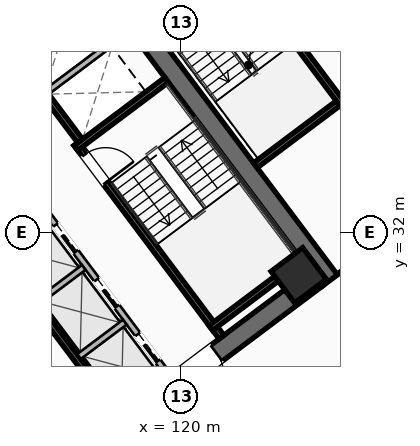
"""IFC4 building model, lengths in metres.
Left out: names, types, materials, properties, quantities, classifications, styles, units other than length and angle.
Written with IfcOpenShell. Run it as: python <this file> out.ifc"""

import sys

from ifc_helpers import new_model, si_unit, direction, frame, frame_2d, origin, origin_2d, place, context, subcontext, project, spatial, rectangle, hollow_rectangle, extrude, element, fill, save


model = new_model("IFC4")
c1 = context("Model", 3, precision=1e-05, world=origin(), true_north=direction((0.0, 1.0)))
c2 = subcontext(c1, "Body", "Model", "MODEL_VIEW")
j1 = project(units=[si_unit("LENGTHUNIT", "METRE"), si_unit("PLANEANGLEUNIT", "RADIAN")], contexts=[c1])
p1 = place(None, origin())
s1 = spatial("IfcSite", under=j1, at=p1, CompositionType="ELEMENT")
p2 = place(p1, origin())
s2 = spatial("IfcBuilding", under=s1, at=p2, CompositionType="ELEMENT")
p3 = place(p2, frame((0.0, 0.0, 42.35)))
s3 = spatial("IfcBuildingStorey", under=s2, at=p3, CompositionType="ELEMENT", Elevation=42.35)
p4 = place(p3, frame((115.524, 42.893, 0.0), z_axis=(0.0, 0.0, 1.0), x_axis=(0.600005007985, -0.799996243986, 0.0)))
e1 = element("IfcWall", 1, at=p4, inside=s3, PredefinedType="SHEAR", context=c2, shape_type="SweptSolid", body=[
    extrude(rectangle(XDim=15.6, YDim=0.65, at=frame_2d((7.8, 0.0))), origin(), (0.0, 0.0, 1.0), 3.55),
])
p5 = place(p3, frame((124.429, 30.478, 0.0), z_axis=(0.0, 0.0, 1.0), x_axis=(-0.799998028465, -0.600002628705, 0.0)))
e2 = element("IfcWall", 2, at=p5, inside=s3, PredefinedType="SHEAR", context=c2, shape_type="SweptSolid", body=[
    extrude(rectangle(XDim=14.86, YDim=0.65, at=frame_2d((7.43, 0.0))), origin(), (0.0, 0.0, 1.0), 3.55),
])
p6 = place(p5, frame((9.13, 0.0, 0.0)))
e3 = element("IfcOpeningElement", 3, at=p6, cuts=e2, PredefinedType="OPENING", context=c2, shape_type="SweptSolid", body=[
    extrude(rectangle(XDim=1.25, YDim=2.25, at=frame_2d((0.625, 1.125))), frame((0.0, 0.335, 0.0), z_axis=(0.0, -1.0, 0.0), x_axis=(1.0, 0.0, 0.0)), (0.0, 0.0, 1.0), 0.67),
])
p7 = place(p5, frame((4.08, 0.0, 0.0)))
e4 = element("IfcOpeningElement", 4, at=p7, cuts=e2, PredefinedType="OPENING", context=c2, shape_type="SweptSolid", body=[
    extrude(rectangle(XDim=1.25, YDim=2.25, at=frame_2d((0.625, 1.125))), frame((0.0, 0.335, 0.0), z_axis=(0.0, -1.0, 0.0), x_axis=(1.0, 0.0, 0.0)), (0.0, 0.0, 1.0), 0.67),
])
p8 = place(p3, frame((123.87, 30.59, 0.0), z_axis=(0.0, 0.0, 1.0), x_axis=(0.799999996291, 0.600000004945, 0.0)))
e5 = element("IfcColumn", 5, at=p8, inside=s3, PredefinedType="COLUMN", context=c2, shape_type="SweptSolid", body=[
    extrude(hollow_rectangle(XDim=1.3, YDim=1.3, WallThickness=0.05, at=origin_2d()), origin(), (0.0, 0.0, 1.0), 3.35),
])
p9 = place(p3, frame((116.56, 34.92, 0.0), z_axis=(0.0, 0.0, 1.0), x_axis=(0.600009827119, -0.799992629566, 0.0)))
e6 = element("IfcWall", 6, at=p9, inside=s3, PredefinedType="SHEAR", context=c2, shape_type="SweptSolid", body=[
    extrude(rectangle(XDim=7.95, YDim=0.2, at=frame_2d((3.975, 0.0))), origin(), (0.0, 0.0, 1.0), 3.35),
])
p10 = place(p9, frame((0.45, 0.0, 0.0)))
e7 = element("IfcOpeningElement", 7, at=p10, cuts=e6, PredefinedType="OPENING", context=c2, shape_type="SweptSolid", body=[
    extrude(rectangle(XDim=1.15, YDim=2.2, at=frame_2d((0.575, 1.1))), frame((0.0, 0.11, 0.0), z_axis=(0.0, -1.0, 0.0), x_axis=(1.0, 0.0, 0.0)), (0.0, 0.0, 1.0), 0.22),
])
for number, where, z_axis, x_axis in (
    (8, (116.54, 34.78, 0.0), (0.0, 0.0, 1.0), (0.8, 0.6, 0.0)),
    (9, (120.98, 28.86, 0.0), (0.0, 0.0, 1.0), (0.8, 0.6, 0.0)),
):
    element("IfcWall", number, at=place(p3, frame(where, z_axis=z_axis, x_axis=x_axis)), inside=s3, PredefinedType="SHEAR", context=c2, shape_type="SweptSolid", body=[
        extrude(rectangle(XDim=3.73, YDim=0.2, at=frame_2d((1.865, 0.0))), origin(), (0.0, 0.0, 1.0), 3.35),
    ])
p11 = place(p3, frame((117.938, 26.016, 0.0), z_axis=(0.0, 0.0, 1.0), x_axis=(-0.600005463273, 0.799995902516, 0.0)))
e10 = element("IfcWall", 10, at=p11, inside=s3, PredefinedType="SHEAR", context=c2, shape_type="SweptSolid", body=[
    extrude(rectangle(XDim=14.3, YDim=0.2, at=frame_2d((7.15, 0.0))), origin(), (0.0, 0.0, 1.0), 3.35),
])
p12 = place(p3, frame((112.87, 40.09, 0.0), z_axis=(0.0, 0.0, 1.0), x_axis=(0.599975393228, -0.800018454488, 0.0)))
e11 = element("IfcWall", 11, at=p12, inside=s3, PredefinedType="SHEAR", context=c2, shape_type="SweptSolid", body=[
    extrude(rectangle(XDim=6.35, YDim=0.2, at=frame_2d((3.175, 0.0))), origin(), (0.0, 0.0, 1.0), 3.35),
])
p13 = place(p3, frame((115.59, 36.63, 0.0), z_axis=(0.0, 0.0, 1.0), x_axis=(0.799973995579, 0.600034670996, 0.0)))
e12 = element("IfcWall", 12, at=p13, inside=s3, PredefinedType="SOLIDWALL", context=c2, shape_type="SweptSolid", body=[
    extrude(rectangle(XDim=3.38, YDim=0.2, at=frame_2d((1.69, 0.0))), origin(), (0.0, 0.0, 1.0), 3.35),
])
p14 = place(p3, frame((119.61, 27.27, 0.0), z_axis=(0.0, 0.0, 1.0), x_axis=(-0.600011488909, 0.79999138319, 0.0)))
e13 = element("IfcWall", 13, at=p14, inside=s3, PredefinedType="SOLIDWALL", context=c2, shape_type="SweptSolid", body=[
    extrude(rectangle(XDim=6.8, YDim=0.2, at=frame_2d((3.4, 0.0))), origin(), (0.0, 0.0, 1.0), 3.35),
])
p15 = place(p14, frame((0.625, 0.0, 0.0)))
e14 = element("IfcOpeningElement", 14, at=p15, cuts=e13, PredefinedType="OPENING", context=c2, shape_type="SweptSolid", body=[
    extrude(rectangle(XDim=1.1, YDim=2.2, at=frame_2d((0.55, 1.1))), frame((0.0, 0.11, 0.0), z_axis=(0.0, -1.0, 0.0), x_axis=(1.0, 0.0, 0.0)), (0.0, 0.0, 1.0), 0.22),
])
p16 = place(p14, frame((2.875, 0.0, 0.0)))
e15 = element("IfcOpeningElement", 15, at=p16, cuts=e13, PredefinedType="OPENING", context=c2, shape_type="SweptSolid", body=[
    extrude(rectangle(XDim=1.1, YDim=2.2, at=frame_2d((0.55, 1.1))), frame((0.0, 0.11, 0.0), z_axis=(0.0, -1.0, 0.0), x_axis=(1.0, 0.0, 0.0)), (0.0, 0.0, 1.0), 0.22),
])
p17 = place(p14, frame((5.125, 0.0, 0.0)))
e16 = element("IfcOpeningElement", 16, at=p17, cuts=e13, PredefinedType="OPENING", context=c2, shape_type="SweptSolid", body=[
    extrude(rectangle(XDim=1.1, YDim=2.2, at=frame_2d((0.55, 1.1))), frame((0.0, 0.11, 0.0), z_axis=(0.0, -1.0, 0.0), x_axis=(1.0, 0.0, 0.0)), (0.0, 0.0, 1.0), 0.22),
])
p18 = place(p3, frame((116.646, 27.922, 0.0), z_axis=(0.0, 0.0, 1.0), x_axis=(0.8, 0.6, 0.0)))
e17 = element("IfcWall", 17, at=p18, inside=s3, PredefinedType="SOLIDWALL", context=c2, shape_type="SweptSolid", body=[
    extrude(rectangle(XDim=1.88, YDim=0.2, at=frame_2d((0.94, 0.0))), origin(), (0.0, 0.0, 1.0), 3.35),
])
p19 = place(p3, frame((115.296, 29.722, 0.0), z_axis=(0.0, 0.0, 1.0), x_axis=(0.799984418148, 0.600020775241, 0.0)))
e18 = element("IfcWall", 18, at=p19, inside=s3, PredefinedType="SOLIDWALL", context=c2, shape_type="SweptSolid", body=[
    extrude(rectangle(XDim=1.88, YDim=0.2, at=frame_2d((0.94, 0.0))), origin(), (0.0, 0.0, 1.0), 3.35),
])
p20 = place(p3, frame((125.304, 36.228, 0.0), z_axis=(0.0, 0.0, 1.0), x_axis=(-0.59998851072, 0.800008616831, 0.0)))
e19 = element("IfcWall", 19, at=p20, inside=s3, PredefinedType="SHEAR", context=c2, shape_type="SweptSolid", body=[
    extrude(rectangle(XDim=6.8, YDim=0.2, at=frame_2d((3.4, 0.0))), origin(), (0.0, 0.0, 1.0), 3.35),
])
p21 = place(p3, frame((122.444, 34.208, 0.0), z_axis=(0.0, 0.0, 1.0), x_axis=(0.79999138319, 0.600011488909, 0.0)))
e20 = element("IfcWall", 20, at=p21, inside=s3, PredefinedType="SHEAR", context=c2, shape_type="SweptSolid", body=[
    extrude(rectangle(XDim=3.4, YDim=0.2, at=frame_2d((1.7, 0.0))), origin(), (0.0, 0.0, 1.0), 3.35),
])
p22 = place(p3, frame((98.084, 34.588, 0.0), z_axis=(0.0, 0.0, 1.0), x_axis=(0.799997053619, 0.600003928488, 0.0)))
e21 = element("IfcWall", 21, at=p22, inside=s3, PredefinedType="PARTITIONING", context=c2, shape_type="SweptSolid", body=[
    extrude(rectangle(XDim=29.83, YDim=0.135, at=frame_2d((14.915, 0.0))), origin(), (0.0, 0.0, 1.0), 2.703),
])
p23 = place(p22, frame((0.3, 0.0, 0.0)))
e22 = element("IfcOpeningElement", 22, at=p23, cuts=e21, PredefinedType="OPENING", context=c2, shape_type="SweptSolid", body=[
    extrude(rectangle(XDim=0.95, YDim=2.05, at=frame_2d((0.475, 1.025))), frame((0.0, 0.077, 0.0), z_axis=(0.0, -1.0, 0.0), x_axis=(1.0, 0.0, 0.0)), (0.0, 0.0, 1.0), 0.155),
])
p24 = place(p22, frame((28.58, 0.0, 0.0)))
e23 = element("IfcOpeningElement", 23, at=p24, cuts=e21, PredefinedType="OPENING", context=c2, shape_type="SweptSolid", body=[
    extrude(rectangle(XDim=0.95, YDim=2.05, at=frame_2d((0.475, 1.025))), frame((0.0, 0.077, 0.0), z_axis=(0.0, -1.0, 0.0), x_axis=(1.0, 0.0, 0.0)), (0.0, 0.0, 1.0), 0.155),
])
p25 = place(p3, frame((135.46, 34.47, 0.0), z_axis=(0.0, 0.0, 1.0), x_axis=(-0.800000982127, -0.599998690494, 0.0)))
e24 = element("IfcWall", 24, at=p25, inside=s3, PredefinedType="PARTITIONING", context=c2, shape_type="SweptSolid", body=[
    extrude(rectangle(XDim=29.83, YDim=0.135, at=frame_2d((14.915, 0.0))), origin(), (0.0, 0.0, 1.0), 2.703),
])
p26 = place(p25, frame((28.5, 0.0, 0.0)))
e25 = element("IfcOpeningElement", 25, at=p26, cuts=e24, PredefinedType="OPENING", context=c2, shape_type="SweptSolid", body=[
    extrude(rectangle(XDim=0.95, YDim=2.05, at=frame_2d((0.475, 1.025))), frame((0.0, 0.077, 0.0), z_axis=(0.0, -1.0, 0.0), x_axis=(1.0, 0.0, 0.0)), (0.0, 0.0, 1.0), 0.155),
])
p27 = place(p25, frame((17.901, 0.0, 0.0)))
e26 = element("IfcOpeningElement", 26, at=p27, cuts=e24, PredefinedType="OPENING", context=c2, shape_type="SweptSolid", body=[
    extrude(rectangle(XDim=0.95, YDim=2.05, at=frame_2d((0.475, 1.025))), frame((0.0, 0.077, 0.0), z_axis=(0.0, -1.0, 0.0), x_axis=(1.0, 0.0, 0.0)), (0.0, 0.0, 1.0), 0.155),
])
p28 = place(p25, frame((13.92, 0.0, 0.0)))
e27 = element("IfcOpeningElement", 27, at=p28, cuts=e24, PredefinedType="OPENING", context=c2, shape_type="SweptSolid", body=[
    extrude(rectangle(XDim=0.95, YDim=2.05, at=frame_2d((0.475, 1.025))), frame((0.0, 0.077, 0.0), z_axis=(0.0, -1.0, 0.0), x_axis=(1.0, 0.0, 0.0)), (0.0, 0.0, 1.0), 0.155),
])
p29 = place(p25, frame((0.38, 0.0, 0.0)))
e28 = element("IfcOpeningElement", 28, at=p29, cuts=e24, PredefinedType="OPENING", context=c2, shape_type="SweptSolid", body=[
    extrude(rectangle(XDim=0.95, YDim=2.05, at=frame_2d((0.475, 1.025))), frame((0.0, 0.077, 0.0), z_axis=(0.0, -1.0, 0.0), x_axis=(1.0, 0.0, 0.0)), (0.0, 0.0, 1.0), 0.155),
])
p30 = place(p3, frame((125.208, 30.656, 0.0), z_axis=(0.0, 0.0, 1.0), x_axis=(0.800002191231, 0.599997078347, 0.0)))
e29 = element("IfcWall", 29, at=p30, inside=s3, PredefinedType="PARTITIONING", context=c2, shape_type="SweptSolid", body=[
    extrude(rectangle(XDim=13.37, YDim=0.135, at=frame_2d((6.685, 0.0))), origin(), (0.0, 0.0, 1.0), 2.703),
])
p31 = place(p30, frame((2.045, 0.0, 0.0)))
e30 = element("IfcOpeningElement", 30, at=p31, cuts=e29, PredefinedType="OPENING", context=c2, shape_type="SweptSolid", body=[
    extrude(rectangle(XDim=0.95, YDim=2.05, at=frame_2d((0.475, 1.025))), frame((0.0, 0.077, 0.0), z_axis=(0.0, -1.0, 0.0), x_axis=(1.0, 0.0, 0.0)), (0.0, 0.0, 1.0), 0.155),
])
p32 = place(p7, origin())
e31 = element("IfcDoor", 31, at=p32, inside=s3, OperationType="SINGLE_SWING_RIGHT", PredefinedType="DOOR", context=c2, shape_type="SweptSolid", body=[
    extrude(rectangle(XDim=1.25, YDim=2.25, at=frame_2d((0.625, 1.125))), frame((0.0, 0.025, 0.0), z_axis=(0.0, -1.0, 0.0), x_axis=(1.0, 0.0, 0.0)), (0.0, 0.0, 1.0), 0.05),
])
fill(e4, e31)
p33 = place(p10, origin())
e32 = element("IfcDoor", 32, at=p33, inside=s3, OperationType="SINGLE_SWING_RIGHT", PredefinedType="DOOR", context=c2, shape_type="SweptSolid", body=[
    extrude(rectangle(XDim=1.15, YDim=2.2, at=frame_2d((0.575, 1.1))), frame((0.0, 0.025, 0.0), z_axis=(0.0, -1.0, 0.0), x_axis=(1.0, 0.0, 0.0)), (0.0, 0.0, 1.0), 0.05),
])
fill(e7, e32)
p34 = place(p15, origin())
e33 = element("IfcDoor", 33, at=p34, inside=s3, OperationType="SLIDING_TO_LEFT", PredefinedType="DOOR", context=c2, shape_type="SweptSolid", body=[
    extrude(rectangle(XDim=1.1, YDim=2.2, at=frame_2d((0.55, 1.1))), frame((0.0, 0.025, 0.0), z_axis=(0.0, -1.0, 0.0), x_axis=(1.0, 0.0, 0.0)), (0.0, 0.0, 1.0), 0.05),
])
fill(e14, e33)
p35 = place(p16, origin())
e34 = element("IfcDoor", 34, at=p35, inside=s3, OperationType="SLIDING_TO_LEFT", PredefinedType="DOOR", context=c2, shape_type="SweptSolid", body=[
    extrude(rectangle(XDim=1.1, YDim=2.2, at=frame_2d((0.55, 1.1))), frame((0.0, 0.025, 0.0), z_axis=(0.0, -1.0, 0.0), x_axis=(1.0, 0.0, 0.0)), (0.0, 0.0, 1.0), 0.05),
])
fill(e15, e34)
p36 = place(p17, origin())
e35 = element("IfcDoor", 35, at=p36, inside=s3, OperationType="SLIDING_TO_LEFT", PredefinedType="DOOR", context=c2, shape_type="SweptSolid", body=[
    extrude(rectangle(XDim=1.1, YDim=2.2, at=frame_2d((0.55, 1.1))), frame((0.0, 0.025, 0.0), z_axis=(0.0, -1.0, 0.0), x_axis=(1.0, 0.0, 0.0)), (0.0, 0.0, 1.0), 0.05),
])
fill(e16, e35)
save(model, sys.argv[1])
